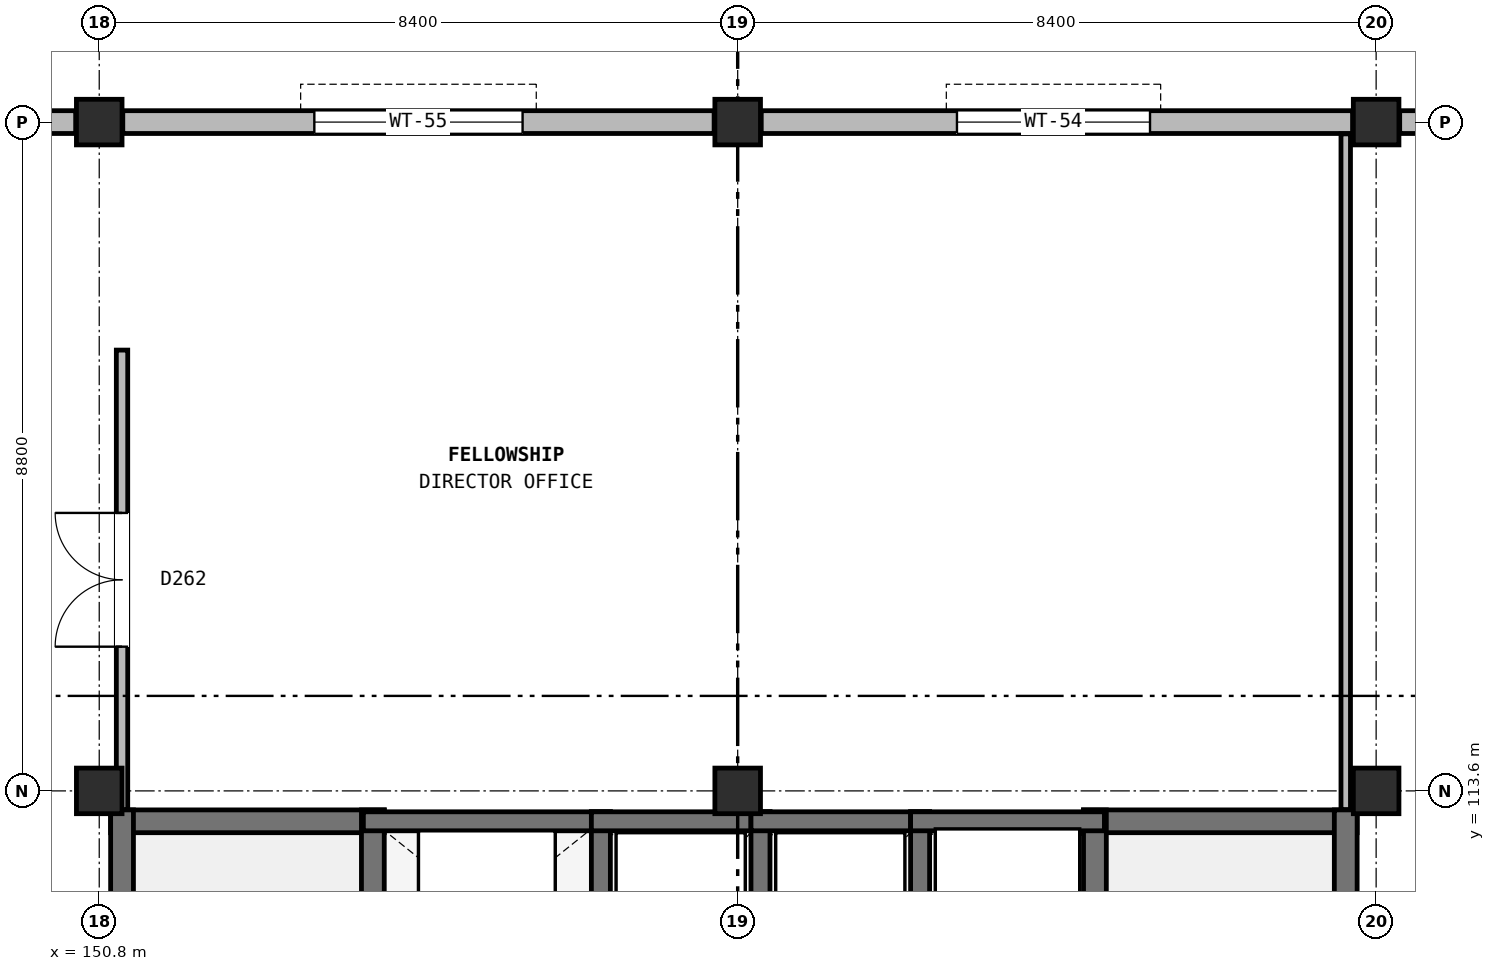
"""IFC4 building model, lengths in metres.
Left out: names, types, materials, properties, quantities, classifications, styles, units other than length and angle.
Written with IfcOpenShell. Run it as: python <this file> out.ifc"""

import sys

from ifc_helpers import new_model, si_unit, direction, frame, frame_2d, origin, origin_2d, place, context, subcontext, project, spatial, rectangle, extrude, element, fill, save


model = new_model("IFC4")
c1 = context("Model", 3, precision=1e-05, world=origin(), true_north=direction((0.0, 1.0)))
c2 = subcontext(c1, "Body", "Model", "MODEL_VIEW")
j1 = project(units=[si_unit("LENGTHUNIT", "METRE"), si_unit("PLANEANGLEUNIT", "RADIAN")], contexts=[c1])
p1 = place(None, origin())
s1 = spatial("IfcSite", under=j1, at=p1, CompositionType="ELEMENT")
p2 = place(p1, origin())
s2 = spatial("IfcBuilding", under=s1, at=p2, CompositionType="ELEMENT")
p3 = place(p2, frame((0.0, 0.0, 48.2)))
s3 = spatial("IfcBuildingStorey", under=s2, at=p3, CompositionType="ELEMENT", Elevation=48.2)
for number, where, z_axis, x_axis in (
    (1, (150.8, 113.6, 0.0), (0.0, 0.0, 1.0), (1.0, 0.0, 0.0)),
    (2, (150.8, 122.4, 0.0), (0.0, 0.0, 1.0), (1.0, 0.0, 0.0)),
    (3, (159.2, 113.6, 0.0), (0.0, 0.0, 1.0), (1.0, 0.0, 0.0)),
    (4, (159.2, 122.4, 0.0), (0.0, 0.0, 1.0), (1.0, 0.0, 0.0)),
    (5, (167.6, 113.6, 0.0), (0.0, 0.0, 1.0), (1.0, 0.0, 0.0)),
    (6, (167.6, 122.4, 0.0), (0.0, 0.0, 1.0), (1.0, 0.0, 0.0)),
):
    element("IfcColumn", number, at=place(p3, frame(where, z_axis=z_axis, x_axis=x_axis)), inside=s3, PredefinedType="COLUMN", context=c2, shape_type="SweptSolid", body=[
        extrude(rectangle(XDim=0.6, YDim=0.6, at=origin_2d()), origin(), (0.0, 0.0, 1.0), 4.0),
    ])
p4 = place(p3, frame((175.69, 122.4, 0.0), z_axis=(0.0, 0.0, 1.0), x_axis=(-1.0, 0.0, 0.0)))
e7 = element("IfcWall", 7, at=p4, inside=s3, PredefinedType="SOLIDWALL", context=c2, shape_type="SweptSolid", body=[
    extrude(rectangle(XDim=7.78, YDim=0.3, at=frame_2d((3.89, 0.0))), origin(), (0.0, 0.0, 1.0), 3.25),
])
p5 = place(p4, frame((0.855, 0.0, 0.9)))
e8 = element("IfcOpeningElement", 8, at=p5, cuts=e7, PredefinedType="OPENING", context=c2, shape_type="SweptSolid", body=[
    extrude(rectangle(XDim=2.38, YDim=2.12, at=frame_2d((1.19, 1.06))), frame((0.0, 0.16, 0.0), z_axis=(0.0, -1.0, 0.0), x_axis=(1.0, 0.0, 0.0)), (0.0, 0.0, 1.0), 0.32),
])
p6 = place(p3, frame((167.29, 122.4, 0.0), z_axis=(0.0, 0.0, 1.0), x_axis=(-1.0, 0.0, 0.0)))
e9 = element("IfcWall", 9, at=p6, inside=s3, PredefinedType="SOLIDWALL", context=c2, shape_type="SweptSolid", body=[
    extrude(rectangle(XDim=7.78, YDim=0.3, at=frame_2d((3.89, 0.0))), origin(), (0.0, 0.0, 1.0), 3.25),
])
p7 = place(p6, frame((2.665, 0.0, 0.9)))
e10 = element("IfcOpeningElement", 10, at=p7, cuts=e9, PredefinedType="OPENING", context=c2, shape_type="SweptSolid", body=[
    extrude(rectangle(XDim=2.54, YDim=2.16, at=frame_2d((1.27, 1.08))), frame((0.0, 0.16, 0.0), z_axis=(0.0, -1.0, 0.0), x_axis=(1.0, 0.0, 0.0)), (0.0, 0.0, 1.0), 0.32),
])
p8 = place(p3, frame((158.89, 122.4, 0.0), z_axis=(0.0, 0.0, 1.0), x_axis=(-1.0, 0.0, 0.0)))
e11 = element("IfcWall", 11, at=p8, inside=s3, PredefinedType="SOLIDWALL", context=c2, shape_type="SweptSolid", body=[
    extrude(rectangle(XDim=7.78, YDim=0.3, at=frame_2d((3.89, 0.0))), origin(), (0.0, 0.0, 1.0), 3.25),
])
p9 = place(p8, frame((2.52, 0.0, 0.9)))
e12 = element("IfcOpeningElement", 12, at=p9, cuts=e11, PredefinedType="OPENING", context=c2, shape_type="SweptSolid", body=[
    extrude(rectangle(XDim=2.74, YDim=2.2, at=frame_2d((1.37, 1.1))), frame((0.0, 0.16, 0.0), z_axis=(0.0, -1.0, 0.0), x_axis=(1.0, 0.0, 0.0)), (0.0, 0.0, 1.0), 0.32),
])
p10 = place(p3, frame((150.49, 122.4, 0.0), z_axis=(0.0, 0.0, 1.0), x_axis=(-1.0, 0.0, 0.0)))
e13 = element("IfcWall", 13, at=p10, inside=s3, PredefinedType="SOLIDWALL", context=c2, shape_type="SweptSolid", body=[
    extrude(rectangle(XDim=7.78, YDim=0.3, at=frame_2d((3.89, 0.0))), origin(), (0.0, 0.0, 1.0), 3.25),
])
p11 = place(p10, frame((2.19, 0.0, 0.9)))
e14 = element("IfcOpeningElement", 14, at=p11, cuts=e13, PredefinedType="OPENING", context=c2, shape_type="SweptSolid", body=[
    extrude(rectangle(XDim=3.4, YDim=2.15, at=frame_2d((1.7, 1.075))), frame((0.0, 0.16, 0.0), z_axis=(0.0, -1.0, 0.0), x_axis=(1.0, 0.0, 0.0)), (0.0, 0.0, 1.0), 0.32),
])
p12 = place(p3, frame((150.95, 113.2, 0.0), z_axis=(0.0, 0.0, 1.0), x_axis=(1.0, 0.0, 0.0)))
e15 = element("IfcWall", 15, at=p12, inside=s3, PredefinedType="SHEAR", context=c2, shape_type="SweptSolid", body=[
    extrude(rectangle(XDim=3.6, YDim=0.3, at=frame_2d((1.8, 0.0))), origin(), (0.0, 0.0, 1.0), 4.0),
])
p13 = place(p3, frame((151.1, 105.05, 0.0), z_axis=(0.0, 0.0, 1.0), x_axis=(0.0, 1.0, 0.0)))
e16 = element("IfcWall", 16, at=p13, inside=s3, PredefinedType="SHEAR", context=c2, shape_type="SweptSolid", body=[
    extrude(rectangle(XDim=8.3, YDim=0.3, at=frame_2d((4.15, 0.0))), origin(), (0.0, 0.0, 1.0), 4.0),
])
p14 = place(p3, frame((154.4, 105.05, 0.0), z_axis=(0.0, 0.0, 1.0), x_axis=(0.0, 1.0, 0.0)))
e17 = element("IfcWall", 17, at=p14, inside=s3, PredefinedType="SHEAR", context=c2, shape_type="SweptSolid", body=[
    extrude(rectangle(XDim=8.3, YDim=0.3, at=frame_2d((4.15, 0.0))), origin(), (0.0, 0.0, 1.0), 4.0),
])
p15 = place(p14, frame((0.45, 0.0, 0.0)))
e18 = element("IfcOpeningElement", 18, at=p15, cuts=e17, PredefinedType="OPENING", context=c2, shape_type="SweptSolid", body=[
    extrude(rectangle(XDim=1.1, YDim=2.2, at=frame_2d((0.55, 1.1))), frame((0.0, 0.16, 0.0), z_axis=(0.0, -1.0, 0.0), x_axis=(1.0, 0.0, 0.0)), (0.0, 0.0, 1.0), 0.32),
])
p16 = place(p3, frame((163.75, 113.2, 0.0), z_axis=(0.0, 0.0, 1.0), x_axis=(1.0, 0.0, 0.0)))
e19 = element("IfcWall", 19, at=p16, inside=s3, PredefinedType="SHEAR", context=c2, shape_type="SweptSolid", body=[
    extrude(rectangle(XDim=3.6, YDim=0.3, at=frame_2d((1.8, 0.0))), origin(), (0.0, 0.0, 1.0), 4.0),
])
for number, where, z_axis, x_axis in (
    (20, (163.9, 105.05, 0.0), (0.0, 0.0, 1.0), (0.0, 1.0, 0.0)),
    (21, (167.2, 105.05, 0.0), (0.0, 0.0, 1.0), (0.0, 1.0, 0.0)),
):
    element("IfcWall", number, at=place(p3, frame(where, z_axis=z_axis, x_axis=x_axis)), inside=s3, PredefinedType="SHEAR", context=c2, shape_type="SweptSolid", body=[
        extrude(rectangle(XDim=8.3, YDim=0.3, at=frame_2d((4.15, 0.0))), origin(), (0.0, 0.0, 1.0), 4.0),
    ])
p17 = place(p3, frame((154.275, 113.2, 0.0), z_axis=(0.0, 0.0, 1.0), x_axis=(1.0, 0.0, 0.0)))
e22 = element("IfcWall", 22, at=p17, inside=s3, PredefinedType="SOLIDWALL", context=c2, shape_type="SweptSolid", body=[
    extrude(rectangle(XDim=3.25, YDim=0.25, at=frame_2d((1.625, 0.0))), origin(), (0.0, 0.0, 1.0), 3.68),
])
p18 = place(p3, frame((157.4, 110.675, 0.0), z_axis=(0.0, 0.0, 1.0), x_axis=(0.0, 1.0, 0.0)))
e23 = element("IfcWall", 23, at=p18, inside=s3, PredefinedType="SOLIDWALL", context=c2, shape_type="SweptSolid", body=[
    extrude(rectangle(XDim=2.65, YDim=0.25, at=frame_2d((1.325, 0.0))), origin(), (0.0, 0.0, 1.0), 3.68),
])
p19 = place(p3, frame((157.275, 113.2, 0.0), z_axis=(0.0, 0.0, 1.0), x_axis=(1.0, 0.0, 0.0)))
e24 = element("IfcWall", 24, at=p19, inside=s3, PredefinedType="SOLIDWALL", context=c2, shape_type="SweptSolid", body=[
    extrude(rectangle(XDim=2.35, YDim=0.25, at=frame_2d((1.175, 0.0))), origin(), (0.0, 0.0, 1.0), 3.68),
])
p20 = place(p3, frame((159.5, 110.675, 0.0), z_axis=(0.0, 0.0, 1.0), x_axis=(0.0, 1.0, 0.0)))
e25 = element("IfcWall", 25, at=p20, inside=s3, PredefinedType="SOLIDWALL", context=c2, shape_type="SweptSolid", body=[
    extrude(rectangle(XDim=2.65, YDim=0.25, at=frame_2d((1.325, 0.0))), origin(), (0.0, 0.0, 1.0), 3.68),
])
p21 = place(p3, frame((159.375, 113.2, 0.0), z_axis=(0.0, 0.0, 1.0), x_axis=(1.0, 0.0, 0.0)))
e26 = element("IfcWall", 26, at=p21, inside=s3, PredefinedType="SOLIDWALL", context=c2, shape_type="SweptSolid", body=[
    extrude(rectangle(XDim=2.35, YDim=0.25, at=frame_2d((1.175, 0.0))), origin(), (0.0, 0.0, 1.0), 3.68),
])
p22 = place(p3, frame((161.6, 110.675, 0.0), z_axis=(0.0, 0.0, 1.0), x_axis=(0.0, 1.0, 0.0)))
e27 = element("IfcWall", 27, at=p22, inside=s3, PredefinedType="SOLIDWALL", context=c2, shape_type="SweptSolid", body=[
    extrude(rectangle(XDim=2.65, YDim=0.25, at=frame_2d((1.325, 0.0))), origin(), (0.0, 0.0, 1.0), 3.68),
])
p23 = place(p3, frame((161.475, 113.2, 0.0), z_axis=(0.0, 0.0, 1.0), x_axis=(1.0, 0.0, 0.0)))
e28 = element("IfcWall", 28, at=p23, inside=s3, PredefinedType="SOLIDWALL", context=c2, shape_type="SweptSolid", body=[
    extrude(rectangle(XDim=2.55, YDim=0.25, at=frame_2d((1.275, 0.0))), origin(), (0.0, 0.0, 1.0), 3.68),
])
p24 = place(p3, frame((151.1, 113.355, 0.0), z_axis=(0.0, 0.0, 1.0), x_axis=(0.0, 1.0, 0.0)))
e29 = element("IfcWall", 29, at=p24, inside=s3, PredefinedType="PARTITIONING", context=c2, shape_type="SweptSolid", body=[
    extrude(rectangle(XDim=6.045, YDim=0.15, at=frame_2d((3.022, 0.0))), origin(), (0.0, 0.0, 1.0), 3.245),
])
p25 = place(p24, frame((2.143, 0.0, 0.0)))
e30 = element("IfcOpeningElement", 30, at=p25, cuts=e29, PredefinedType="OPENING", context=c2, shape_type="SweptSolid", body=[
    extrude(rectangle(XDim=1.76, YDim=2.36, at=frame_2d((0.88, 1.18))), frame((0.0, 0.085, 0.0), z_axis=(0.0, -1.0, 0.0), x_axis=(1.0, 0.0, 0.0)), (0.0, 0.0, 1.0), 0.17),
])
p26 = place(p3, frame((167.2, 113.355, 0.0), z_axis=(0.0, 0.0, 1.0), x_axis=(0.0, 1.0, 0.0)))
e31 = element("IfcWall", 31, at=p26, inside=s3, PredefinedType="PARTITIONING", context=c2, shape_type="SweptSolid", body=[
    extrude(rectangle(XDim=8.89, YDim=0.125, at=frame_2d((4.445, 0.0))), origin(), (0.0, 0.0, 1.0), 3.245),
])
p27 = place(p7, origin())
e32 = element("IfcWindow", 32, at=p27, inside=s3, PartitioningType="SINGLE_PANEL", PredefinedType="WINDOW", context=c2, shape_type="SweptSolid", body=[
    extrude(rectangle(XDim=2.54, YDim=2.16, at=frame_2d((1.27, 1.08))), frame((0.0, 0.03, 0.0), z_axis=(0.0, -1.0, 0.0), x_axis=(1.0, 0.0, 0.0)), (0.0, 0.0, 1.0), 0.06),
])
fill(e10, e32)
p28 = place(p9, origin())
e33 = element("IfcWindow", 33, at=p28, inside=s3, PartitioningType="SINGLE_PANEL", PredefinedType="WINDOW", context=c2, shape_type="SweptSolid", body=[
    extrude(rectangle(XDim=2.74, YDim=2.2, at=frame_2d((1.37, 1.1))), frame((0.0, 0.03, 0.0), z_axis=(0.0, -1.0, 0.0), x_axis=(1.0, 0.0, 0.0)), (0.0, 0.0, 1.0), 0.06),
])
fill(e12, e33)
p29 = place(p25, origin())
e34 = element("IfcDoor", 34, at=p29, inside=s3, OperationType="DOUBLE_DOOR_SINGLE_SWING", PredefinedType="DOOR", context=c2, shape_type="SweptSolid", body=[
    extrude(rectangle(XDim=1.76, YDim=2.36, at=frame_2d((0.88, 1.18))), frame((0.0, 0.025, 0.0), z_axis=(0.0, -1.0, 0.0), x_axis=(1.0, 0.0, 0.0)), (0.0, 0.0, 1.0), 0.05),
])
fill(e30, e34)
save(model, sys.argv[1])
